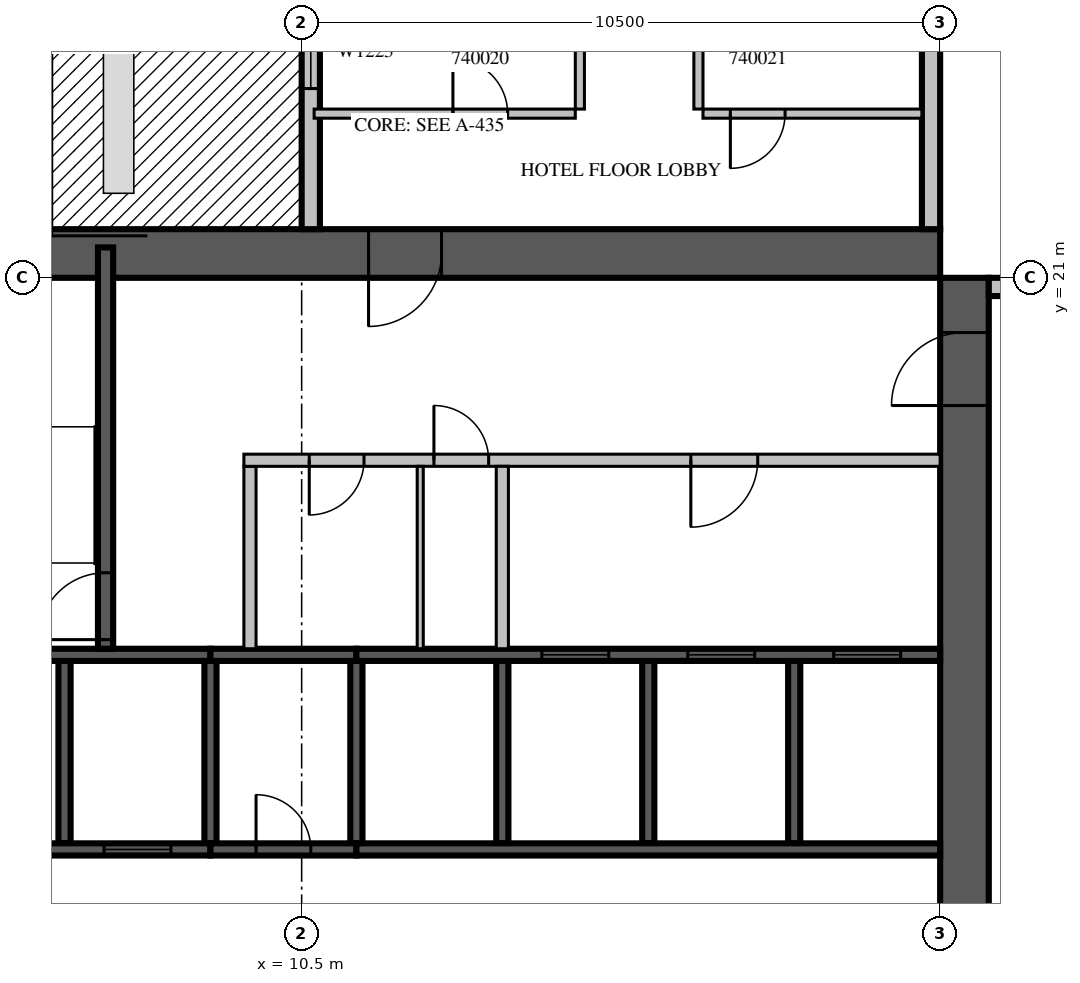
"""IFC4 building model, lengths in metres.
Left out: names, types, materials, properties, quantities, classifications, styles, units other than length and angle.
Written with IfcOpenShell. Run it as: python <this file> out.ifc"""

import sys

from ifc_helpers import new_model, si_unit, direction, frame, frame_2d, origin, place, context, subcontext, project, spatial, rectangle, extrude, source, transform, mapped, element, fill, save


model = new_model("IFC4")
c1 = context("Model", 3, precision=1e-05, world=origin(), true_north=direction((0.0, 1.0)))
c2 = subcontext(c1, "Body", "Model", "MODEL_VIEW")
j1 = project(units=[si_unit("LENGTHUNIT", "METRE"), si_unit("PLANEANGLEUNIT", "RADIAN")], contexts=[c1])
p1 = place(None, origin())
s1 = spatial("IfcSite", under=j1, at=p1, CompositionType="ELEMENT")
p2 = place(p1, origin())
s2 = spatial("IfcBuilding", under=s1, at=p2, CompositionType="ELEMENT")
p3 = place(p2, frame((0.0, 0.0, 185.4)))
s3 = spatial("IfcBuildingStorey", under=s2, at=p3, CompositionType="ELEMENT", Elevation=185.4)
m1 = source(origin(), c2, "Body", "SweptSolid", [
    extrude(rectangle(XDim=16.8, YDim=0.8, at=frame_2d((8.4, 0.0))), origin(), (0.0, 0.0, 1.0), 3.8),
])
p4 = place(p3, frame((21.4, 4.2, 0.0), z_axis=(0.0, 0.0, 1.0), x_axis=(0.0, 1.0, 0.0)))
e1 = element("IfcWall", 1, at=p4, inside=s3, PredefinedType="SHEAR", context=c2, shape_type="MappedRepresentation", body=[
    mapped(m1, transform((0.0, 0.0, 0.0), scale=1.0)),
])
m2 = source(origin(), c2, "Body", "SweptSolid", [
    extrude(rectangle(XDim=2.2, YDim=2.1, at=frame_2d((1.1, 1.05))), frame((0.0, 0.41, 0.0), z_axis=(0.0, -1.0, 0.0), x_axis=(1.0, 0.0, 0.0)), (0.0, 0.0, 1.0), 0.82),
])
p5 = place(p4, frame((4.2, 0.0, 0.0)))
e2 = element("IfcOpeningElement", 2, at=p5, cuts=e1, PredefinedType="OPENING", context=c2, shape_type="MappedRepresentation", body=[
    mapped(m2, transform((0.0, 0.0, 0.0), scale=1.0)),
])
m3 = source(origin(), c2, "Body", "SweptSolid", [
    extrude(rectangle(XDim=1.2, YDim=2.1, at=frame_2d((0.6, 1.05))), frame((0.0, 0.41, 0.0), z_axis=(0.0, -1.0, 0.0), x_axis=(1.0, 0.0, 0.0)), (0.0, 0.0, 1.0), 0.82),
])
p6 = place(p4, frame((14.7, 0.0, 0.0)))
e3 = element("IfcOpeningElement", 3, at=p6, cuts=e1, PredefinedType="OPENING", context=c2, shape_type="MappedRepresentation", body=[
    mapped(m3, transform((0.0, 0.0, 0.0), scale=1.0)),
])
p7 = place(p3, frame((4.2, 21.4, 0.0), z_axis=(0.0, 0.0, 1.0), x_axis=(1.0, 0.0, 0.0)))
e4 = element("IfcWall", 4, at=p7, inside=s3, PredefinedType="SHEAR", context=c2, shape_type="MappedRepresentation", body=[
    mapped(m1, transform((0.0, 0.0, 0.0), scale=1.0)),
])
p8 = place(p7, frame((7.4, 0.0, 0.0)))
e5 = element("IfcOpeningElement", 5, at=p8, cuts=e4, PredefinedType="OPENING", context=c2, shape_type="MappedRepresentation", body=[
    mapped(m3, transform((0.0, 0.0, 0.0), scale=1.0)),
])
m4 = source(origin(), c2, "Body", "SweptSolid", [
    extrude(rectangle(XDim=7.15, YDim=0.3, at=frame_2d((3.575, 0.0))), origin(), (0.0, 0.0, 1.0), 3.4),
])
p9 = place(p3, frame((28.95, 20.85, 0.0), z_axis=(0.0, 0.0, 1.0), x_axis=(-1.0, 0.0, 0.0)))
e6 = element("IfcWall", 6, at=p9, inside=s3, PredefinedType="STANDARD", context=c2, shape_type="MappedRepresentation", body=[
    mapped(m4, transform((0.0, 0.0, 0.0), scale=1.0)),
])
m5 = source(origin(), c2, "Body", "SweptSolid", [
    extrude(rectangle(XDim=3.0, YDim=2.3, at=frame_2d((1.5, 1.15))), frame((0.0, 0.16, 0.0), z_axis=(0.0, -1.0, 0.0), x_axis=(1.0, 0.0, 0.0)), (0.0, 0.0, 1.0), 0.32),
])
p10 = place(p9, frame((0.15, 0.0, 0.6)))
e7 = element("IfcOpeningElement", 7, at=p10, cuts=e6, PredefinedType="OPENING", context=c2, shape_type="MappedRepresentation", body=[
    mapped(m5, transform((0.0, 0.0, 0.0), scale=1.0)),
])
p11 = place(p3, frame((20.85, 21.8, 0.0), z_axis=(0.0, 0.0, 1.0), x_axis=(0.0, 1.0, 0.0)))
e8 = element("IfcWall", 8, at=p11, inside=s3, PredefinedType="STANDARD", context=c2, shape_type="MappedRepresentation", body=[
    mapped(m4, transform((0.0, 0.0, 0.0), scale=1.0)),
])
p12 = place(p11, frame((4.0, 0.0, 0.6)))
e9 = element("IfcOpeningElement", 9, at=p12, cuts=e8, PredefinedType="OPENING", context=c2, shape_type="MappedRepresentation", body=[
    mapped(m5, transform((0.0, 0.0, 0.0), scale=1.0)),
])
p13 = place(p3, frame((10.65, 28.95, 0.0), z_axis=(0.0, 0.0, 1.0), x_axis=(0.0, -1.0, 0.0)))
e10 = element("IfcWall", 10, at=p13, inside=s3, PredefinedType="STANDARD", context=c2, shape_type="MappedRepresentation", body=[
    mapped(m4, transform((0.0, 0.0, 0.0), scale=1.0)),
])
m6 = source(origin(), c2, "Body", "SweptSolid", [
    extrude(rectangle(XDim=1.8, YDim=2.4, at=frame_2d((0.9, 1.2))), frame((0.0, 0.16, 0.0), z_axis=(0.0, -1.0, 0.0), x_axis=(1.0, 0.0, 0.0)), (0.0, 0.0, 1.0), 0.32),
])
p14 = place(p13, frame((0.15, 0.0, 0.0)))
e11 = element("IfcOpeningElement", 11, at=p14, cuts=e10, PredefinedType="OPENING", context=c2, shape_type="MappedRepresentation", body=[
    mapped(m6, transform((0.0, 0.0, 0.0), scale=1.0)),
])
m7 = source(origin(), c2, "Body", "SweptSolid", [
    extrude(rectangle(XDim=1.2, YDim=2.3, at=frame_2d((0.6, 1.15))), frame((0.0, 0.16, 0.0), z_axis=(0.0, -1.0, 0.0), x_axis=(1.0, 0.0, 0.0)), (0.0, 0.0, 1.0), 0.32),
])
p15 = place(p13, frame((3.638, 0.0, 0.6)))
e12 = element("IfcOpeningElement", 12, at=p15, cuts=e10, PredefinedType="OPENING", context=c2, shape_type="MappedRepresentation", body=[
    mapped(m7, transform((0.0, 0.0, 0.0), scale=1.0)),
])
m8 = source(origin(), c2, "Body", "SweptSolid", [
    extrude(rectangle(XDim=3.0, YDim=0.2, at=frame_2d((1.5, 0.0))), origin(), (0.0, 0.0, 1.0), 3.8),
])
p16 = place(p3, frame((6.6, 11.7, 0.0), z_axis=(0.0, 0.0, 1.0), x_axis=(0.0, 1.0, 0.0)))
e13 = element("IfcWall", 13, at=p16, inside=s3, PredefinedType="SOLIDWALL", context=c2, shape_type="MappedRepresentation", body=[
    mapped(m8, transform((0.0, 0.0, 0.0), scale=1.0)),
])
m9 = source(origin(), c2, "Body", "SweptSolid", [
    extrude(rectangle(XDim=3.0, YDim=0.2, at=frame_2d((1.5, 0.0))), origin(), (0.0, 0.0, 1.0), 3.4),
])
for number, where, z_axis, x_axis in (
    (14, (9.0, 11.7, 0.0), (0.0, 0.0, 1.0), (0.0, 1.0, 0.0)),
    (15, (11.4, 11.7, 0.0), (0.0, 0.0, 1.0), (0.0, 1.0, 0.0)),
):
    element("IfcWall", number, at=place(p3, frame(where, z_axis=z_axis, x_axis=x_axis)), inside=s3, PredefinedType="SOLIDWALL", context=c2, shape_type="MappedRepresentation", body=[
        mapped(m9, transform((0.0, 0.0, 0.0), scale=1.0)),
    ])
for number, where, z_axis, x_axis in (
    (16, (13.8, 11.7, 0.0), (0.0, 0.0, 1.0), (0.0, 1.0, 0.0)),
    (17, (16.2, 11.7, 0.0), (0.0, 0.0, 1.0), (0.0, 1.0, 0.0)),
    (18, (18.6, 11.7, 0.0), (0.0, 0.0, 1.0), (0.0, 1.0, 0.0)),
):
    element("IfcWall", number, at=place(p3, frame(where, z_axis=z_axis, x_axis=x_axis)), inside=s3, PredefinedType="SOLIDWALL", context=c2, shape_type="MappedRepresentation", body=[
        mapped(m8, transform((0.0, 0.0, 0.0), scale=1.0)),
    ])
m10 = source(origin(), c2, "Body", "SweptSolid", [
    extrude(rectangle(XDim=4.8, YDim=0.2, at=frame_2d((2.4, 0.0))), origin(), (0.0, 0.0, 1.0), 3.8),
])
p17 = place(p3, frame((4.2, 11.6, 0.0), z_axis=(0.0, 0.0, 1.0), x_axis=(1.0, 0.0, 0.0)))
e19 = element("IfcWall", 19, at=p17, inside=s3, PredefinedType="SOLIDWALL", context=c2, shape_type="MappedRepresentation", body=[
    mapped(m10, transform((0.0, 0.0, 0.0), scale=1.0)),
])
m11 = source(origin(), c2, "Body", "SweptSolid", [
    extrude(rectangle(XDim=1.1, YDim=2.1, at=frame_2d((0.55, 1.05))), frame((0.0, 0.11, 0.0), z_axis=(0.0, -1.0, 0.0), x_axis=(1.0, 0.0, 0.0)), (0.0, 0.0, 1.0), 0.22),
])
p18 = place(p17, frame((0.65, 0.0, 0.0)))
e20 = element("IfcOpeningElement", 20, at=p18, cuts=e19, PredefinedType="OPENING", context=c2, shape_type="MappedRepresentation", body=[
    mapped(m11, transform((0.0, 0.0, 0.0), scale=1.0)),
])
p19 = place(p17, frame((3.05, 0.0, 0.0)))
e21 = element("IfcOpeningElement", 21, at=p19, cuts=e19, PredefinedType="OPENING", context=c2, shape_type="MappedRepresentation", body=[
    mapped(m11, transform((0.0, 0.0, 0.0), scale=1.0)),
])
m12 = source(origin(), c2, "Body", "SweptSolid", [
    extrude(rectangle(XDim=2.4, YDim=0.2, at=frame_2d((1.2, 0.0))), origin(), (0.0, 0.0, 1.0), 3.4),
])
p20 = place(p3, frame((9.0, 11.6, 0.0), z_axis=(0.0, 0.0, 1.0), x_axis=(1.0, 0.0, 0.0)))
e22 = element("IfcWall", 22, at=p20, inside=s3, PredefinedType="SOLIDWALL", context=c2, shape_type="MappedRepresentation", body=[
    mapped(m12, transform((0.0, 0.0, 0.0), scale=1.0)),
])
m13 = source(origin(), c2, "Body", "SweptSolid", [
    extrude(rectangle(XDim=0.9, YDim=2.1, at=frame_2d((0.45, 1.05))), frame((0.0, 0.11, 0.0), z_axis=(0.0, -1.0, 0.0), x_axis=(1.0, 0.0, 0.0)), (0.0, 0.0, 1.0), 0.22),
])
p21 = place(p20, frame((0.75, 0.0, 0.0)))
e23 = element("IfcOpeningElement", 23, at=p21, cuts=e22, PredefinedType="OPENING", context=c2, shape_type="MappedRepresentation", body=[
    mapped(m13, transform((0.0, 0.0, 0.0), scale=1.0)),
])
m14 = source(origin(), c2, "Body", "SweptSolid", [
    extrude(rectangle(XDim=9.6, YDim=0.2, at=frame_2d((4.8, 0.0))), origin(), (0.0, 0.0, 1.0), 3.8),
])
p22 = place(p3, frame((11.4, 11.6, 0.0), z_axis=(0.0, 0.0, 1.0), x_axis=(1.0, 0.0, 0.0)))
e24 = element("IfcWall", 24, at=p22, inside=s3, PredefinedType="SOLIDWALL", context=c2, shape_type="MappedRepresentation", body=[
    mapped(m14, transform((0.0, 0.0, 0.0), scale=1.0)),
])
p23 = place(p3, frame((4.2, 14.8, 0.0), z_axis=(0.0, 0.0, 1.0), x_axis=(1.0, 0.0, 0.0)))
e25 = element("IfcWall", 25, at=p23, inside=s3, PredefinedType="SOLIDWALL", context=c2, shape_type="MappedRepresentation", body=[
    mapped(m10, transform((0.0, 0.0, 0.0), scale=1.0)),
])
p24 = place(p3, frame((9.0, 14.8, 0.0), z_axis=(0.0, 0.0, 1.0), x_axis=(1.0, 0.0, 0.0)))
e26 = element("IfcWall", 26, at=p24, inside=s3, PredefinedType="SOLIDWALL", context=c2, shape_type="MappedRepresentation", body=[
    mapped(m12, transform((0.0, 0.0, 0.0), scale=1.0)),
])
p25 = place(p3, frame((11.4, 14.8, 0.0), z_axis=(0.0, 0.0, 1.0), x_axis=(1.0, 0.0, 0.0)))
e27 = element("IfcWall", 27, at=p25, inside=s3, PredefinedType="SOLIDWALL", context=c2, shape_type="MappedRepresentation", body=[
    mapped(m14, transform((0.0, 0.0, 0.0), scale=1.0)),
])
p26 = place(p25, frame((3.05, 0.0, 0.0)))
e28 = element("IfcOpeningElement", 28, at=p26, cuts=e27, PredefinedType="OPENING", context=c2, shape_type="MappedRepresentation", body=[
    mapped(m11, transform((0.0, 0.0, 0.0), scale=1.0)),
])
p27 = place(p25, frame((5.45, 0.0, 0.0)))
e29 = element("IfcOpeningElement", 29, at=p27, cuts=e27, PredefinedType="OPENING", context=c2, shape_type="MappedRepresentation", body=[
    mapped(m11, transform((0.0, 0.0, 0.0), scale=1.0)),
])
p28 = place(p25, frame((7.85, 0.0, 0.0)))
e30 = element("IfcOpeningElement", 30, at=p28, cuts=e27, PredefinedType="OPENING", context=c2, shape_type="MappedRepresentation", body=[
    mapped(m11, transform((0.0, 0.0, 0.0), scale=1.0)),
])
m15 = source(origin(), c2, "Body", "SweptSolid", [
    extrude(rectangle(XDim=6.6, YDim=0.25, at=frame_2d((3.3, 0.0))), origin(), (0.0, 0.0, 1.0), 3.4),
])
p29 = place(p3, frame((7.275, 14.9, 0.0), z_axis=(0.0, 0.0, 1.0), x_axis=(0.0, 1.0, 0.0)))
e31 = element("IfcWall", 31, at=p29, inside=s3, PredefinedType="SOLIDWALL", context=c2, shape_type="MappedRepresentation", body=[
    mapped(m15, transform((0.0, 0.0, 0.0), scale=1.0)),
])
m16 = source(origin(), c2, "Body", "SweptSolid", [
    extrude(rectangle(XDim=1.1, YDim=2.1, at=frame_2d((0.55, 1.05))), frame((0.0, 0.135, 0.0), z_axis=(0.0, -1.0, 0.0), x_axis=(1.0, 0.0, 0.0)), (0.0, 0.0, 1.0), 0.27),
])
p30 = place(p29, frame((0.15, 0.0, 0.0)))
e32 = element("IfcOpeningElement", 32, at=p30, cuts=e31, PredefinedType="OPENING", context=c2, shape_type="MappedRepresentation", body=[
    mapped(m16, transform((0.0, 0.0, 0.0), scale=1.0)),
])
m17 = source(origin(), c2, "Body", "SweptSolid", [
    extrude(rectangle(XDim=3.0, YDim=0.2, at=frame_2d((1.5, 0.0))), origin(), (0.0, 0.0, 1.0), 3.4),
])
p31 = place(p3, frame((9.65, 14.9, 0.0), z_axis=(0.0, 0.0, 1.0), x_axis=(0.0, 1.0, 0.0)))
e33 = element("IfcWall", 33, at=p31, inside=s3, PredefinedType="PARTITIONING", context=c2, shape_type="MappedRepresentation", body=[
    mapped(m17, transform((0.0, 0.0, 0.0), scale=1.0)),
])
m18 = source(origin(), c2, "Body", "SweptSolid", [
    extrude(rectangle(XDim=11.45, YDim=0.2, at=frame_2d((5.725, 0.0))), origin(), (0.0, 0.0, 1.0), 3.4),
])
p32 = place(p3, frame((9.55, 18.0, 0.0), z_axis=(0.0, 0.0, 1.0), x_axis=(1.0, 0.0, 0.0)))
e34 = element("IfcWall", 34, at=p32, inside=s3, PredefinedType="PARTITIONING", context=c2, shape_type="MappedRepresentation", body=[
    mapped(m18, transform((0.0, 0.0, 0.0), scale=1.0)),
])
p33 = place(p32, frame((1.075, 0.0, 0.0)))
e35 = element("IfcOpeningElement", 35, at=p33, cuts=e34, PredefinedType="OPENING", context=c2, shape_type="MappedRepresentation", body=[
    mapped(m13, transform((0.0, 0.0, 0.0), scale=1.0)),
])
p34 = place(p32, frame((3.125, 0.0, 0.0)))
e36 = element("IfcOpeningElement", 36, at=p34, cuts=e34, PredefinedType="OPENING", context=c2, shape_type="MappedRepresentation", body=[
    mapped(m13, transform((0.0, 0.0, 0.0), scale=1.0)),
])
p35 = place(p32, frame((7.35, 0.0, 0.0)))
e37 = element("IfcOpeningElement", 37, at=p35, cuts=e34, PredefinedType="OPENING", context=c2, shape_type="MappedRepresentation", body=[
    mapped(m11, transform((0.0, 0.0, 0.0), scale=1.0)),
])
p36 = place(p3, frame((13.8, 14.9, 0.0), z_axis=(0.0, 0.0, 1.0), x_axis=(0.0, 1.0, 0.0)))
e38 = element("IfcWall", 38, at=p36, inside=s3, PredefinedType="PARTITIONING", context=c2, shape_type="MappedRepresentation", body=[
    mapped(m17, transform((0.0, 0.0, 0.0), scale=1.0)),
])
m19 = source(origin(), c2, "Body", "SweptSolid", [
    extrude(rectangle(XDim=3.0, YDim=0.1, at=frame_2d((1.5, 0.0))), origin(), (0.0, 0.0, 1.0), 3.4),
])
p37 = place(p3, frame((12.45, 14.9, 0.0), z_axis=(0.0, 0.0, 1.0), x_axis=(0.0, 1.0, 0.0)))
e39 = element("IfcWall", 39, at=p37, inside=s3, PredefinedType="PARTITIONING", context=c2, shape_type="MappedRepresentation", body=[
    mapped(m19, transform((0.0, 0.0, 0.0), scale=1.0)),
])
p38 = place(p3, frame((10.705, 23.7, 0.0), z_axis=(0.0, 0.0, 1.0), x_axis=(1.0, 0.0, 0.0)))
e40 = element("IfcWall", 40, at=p38, inside=s3, PredefinedType="PARTITIONING", context=c2, shape_type="SweptSolid", body=[
    extrude(rectangle(XDim=4.295, YDim=0.15, at=frame_2d((2.147, 0.0))), origin(), (0.0, 0.0, 1.0), 3.4),
])
m20 = source(origin(), c2, "Body", "SweptSolid", [
    extrude(rectangle(XDim=0.9, YDim=2.1, at=frame_2d((0.45, 1.05))), frame((0.0, 0.085, 0.0), z_axis=(0.0, -1.0, 0.0), x_axis=(1.0, 0.0, 0.0)), (0.0, 0.0, 1.0), 0.17),
])
p39 = place(p38, frame((2.283, 0.0, 0.0)))
e41 = element("IfcOpeningElement", 41, at=p39, cuts=e40, PredefinedType="OPENING", context=c2, shape_type="MappedRepresentation", body=[
    mapped(m20, transform((0.0, 0.0, 0.0), scale=1.0)),
])
m21 = source(origin(), c2, "Body", "SweptSolid", [
    extrude(rectangle(XDim=3.6, YDim=0.15, at=frame_2d((1.8, 0.0))), origin(), (0.0, 0.0, 1.0), 3.4),
])
p40 = place(p3, frame((17.1, 23.7, 0.0), z_axis=(0.0, 0.0, 1.0), x_axis=(1.0, 0.0, 0.0)))
e42 = element("IfcWall", 42, at=p40, inside=s3, PredefinedType="PARTITIONING", context=c2, shape_type="MappedRepresentation", body=[
    mapped(m21, transform((0.0, 0.0, 0.0), scale=1.0)),
])
p41 = place(p40, frame((0.45, 0.0, 0.0)))
e43 = element("IfcOpeningElement", 43, at=p41, cuts=e42, PredefinedType="OPENING", context=c2, shape_type="MappedRepresentation", body=[
    mapped(m20, transform((0.0, 0.0, 0.0), scale=1.0)),
])
m22 = source(origin(), c2, "Body", "SweptSolid", [
    extrude(rectangle(XDim=5.55, YDim=0.15, at=frame_2d((2.775, 0.0))), origin(), (0.0, 0.0, 1.0), 3.4),
])
for number, where, z_axis, x_axis in (
    (44, (15.075, 23.775, 0.0), (0.0, 0.0, 1.0), (0.0, 1.0, 0.0)),
    (45, (17.025, 29.325, 0.0), (0.0, 0.0, 1.0), (0.0, -1.0, 0.0)),
):
    element("IfcWall", number, at=place(p3, frame(where, z_axis=z_axis, x_axis=x_axis)), inside=s3, PredefinedType="PARTITIONING", context=c2, shape_type="MappedRepresentation", body=[
        mapped(m22, transform((0.0, 0.0, 0.0), scale=1.0)),
    ])
m23 = source(origin(), c2, "Body", "SweptSolid", [
    extrude(rectangle(XDim=1.2, YDim=2.3, at=frame_2d((0.6, 1.15))), frame((0.0, 0.03, 0.0), z_axis=(0.0, -1.0, 0.0), x_axis=(1.0, 0.0, 0.0)), (0.0, 0.0, 1.0), 0.06),
])
p42 = place(p15, origin())
e46 = element("IfcWindow", 46, at=p42, inside=s3, PartitioningType="SINGLE_PANEL", PredefinedType="WINDOW", context=c2, shape_type="MappedRepresentation", body=[
    mapped(m23, transform((0.0, 0.0, 0.0), scale=1.0)),
])
fill(e12, e46)
m24 = source(origin(), c2, "Body", "SweptSolid", [
    extrude(rectangle(XDim=1.1, YDim=2.1, at=frame_2d((0.55, 1.05))), frame((0.0, 0.025, 0.0), z_axis=(0.0, -1.0, 0.0), x_axis=(1.0, 0.0, 0.0)), (0.0, 0.0, 1.0), 0.05),
])
p43 = place(p19, origin())
e47 = element("IfcDoor", 47, at=p43, inside=s3, OperationType="SLIDING_TO_LEFT", PredefinedType="DOOR", context=c2, shape_type="MappedRepresentation", body=[
    mapped(m24, transform((0.0, 0.0, 0.0), scale=1.0)),
])
fill(e21, e47)
m25 = source(origin(), c2, "Body", "SweptSolid", [
    extrude(rectangle(XDim=0.9, YDim=2.1, at=frame_2d((0.45, 1.05))), frame((0.0, 0.025, 0.0), z_axis=(0.0, -1.0, 0.0), x_axis=(1.0, 0.0, 0.0)), (0.0, 0.0, 1.0), 0.05),
])
p44 = place(p21, origin())
e48 = element("IfcDoor", 48, at=p44, inside=s3, OperationType="SINGLE_SWING_LEFT", PredefinedType="DOOR", context=c2, shape_type="MappedRepresentation", body=[
    mapped(m25, transform((0.0, 0.0, 0.0), scale=1.0)),
])
fill(e23, e48)
p45 = place(p26, origin())
e49 = element("IfcDoor", 49, at=p45, inside=s3, OperationType="SLIDING_TO_LEFT", PredefinedType="DOOR", context=c2, shape_type="MappedRepresentation", body=[
    mapped(m24, transform((0.0, 0.0, 0.0), scale=1.0)),
])
fill(e28, e49)
p46 = place(p27, origin())
e50 = element("IfcDoor", 50, at=p46, inside=s3, OperationType="SLIDING_TO_LEFT", PredefinedType="DOOR", context=c2, shape_type="MappedRepresentation", body=[
    mapped(m24, transform((0.0, 0.0, 0.0), scale=1.0)),
])
fill(e29, e50)
p47 = place(p28, origin())
e51 = element("IfcDoor", 51, at=p47, inside=s3, OperationType="SLIDING_TO_LEFT", PredefinedType="DOOR", context=c2, shape_type="MappedRepresentation", body=[
    mapped(m24, transform((0.0, 0.0, 0.0), scale=1.0)),
])
fill(e30, e51)
p48 = place(p30, origin())
e52 = element("IfcDoor", 52, at=p48, inside=s3, OperationType="SINGLE_SWING_LEFT", PredefinedType="DOOR", context=c2, shape_type="MappedRepresentation", body=[
    mapped(m24, transform((0.0, 0.0, 0.0), scale=1.0)),
])
fill(e32, e52)
p49 = place(p33, origin())
e53 = element("IfcDoor", 53, at=p49, inside=s3, OperationType="SINGLE_SWING_RIGHT", PredefinedType="DOOR", context=c2, shape_type="MappedRepresentation", body=[
    mapped(m25, transform((0.0, 0.0, 0.0), scale=1.0)),
])
fill(e35, e53)
p50 = place(p34, origin())
e54 = element("IfcDoor", 54, at=p50, inside=s3, OperationType="SINGLE_SWING_LEFT", PredefinedType="DOOR", context=c2, shape_type="MappedRepresentation", body=[
    mapped(m25, transform((0.0, 0.0, 0.0), scale=1.0)),
])
fill(e36, e54)
p51 = place(p35, origin())
e55 = element("IfcDoor", 55, at=p51, inside=s3, OperationType="SINGLE_SWING_RIGHT", PredefinedType="DOOR", context=c2, shape_type="MappedRepresentation", body=[
    mapped(m24, transform((0.0, 0.0, 0.0), scale=1.0)),
])
fill(e37, e55)
m26 = source(origin(), c2, "Body", "SweptSolid", [
    extrude(rectangle(XDim=1.2, YDim=2.1, at=frame_2d((0.6, 1.05))), frame((0.0, 0.025, 0.0), z_axis=(0.0, -1.0, 0.0), x_axis=(1.0, 0.0, 0.0)), (0.0, 0.0, 1.0), 0.05),
])
p52 = place(p8, origin())
e56 = element("IfcDoor", 56, at=p52, inside=s3, OperationType="SINGLE_SWING_RIGHT", PredefinedType="DOOR", context=c2, shape_type="MappedRepresentation", body=[
    mapped(m26, transform((0.0, 0.0, 0.0), scale=1.0)),
])
fill(e5, e56)
p53 = place(p6, origin())
e57 = element("IfcDoor", 57, at=p53, inside=s3, OperationType="SINGLE_SWING_LEFT", PredefinedType="DOOR", context=c2, shape_type="MappedRepresentation", body=[
    mapped(m26, transform((0.0, 0.0, 0.0), scale=1.0)),
])
fill(e3, e57)
p54 = place(p39, origin())
e58 = element("IfcDoor", 58, at=p54, inside=s3, OperationType="SINGLE_SWING_LEFT", PredefinedType="DOOR", context=c2, shape_type="MappedRepresentation", body=[
    mapped(m25, transform((0.0, 0.0, 0.0), scale=1.0)),
])
fill(e41, e58)
p55 = place(p41, origin())
e59 = element("IfcDoor", 59, at=p55, inside=s3, OperationType="SINGLE_SWING_RIGHT", PredefinedType="DOOR", context=c2, shape_type="MappedRepresentation", body=[
    mapped(m25, transform((0.0, 0.0, 0.0), scale=1.0)),
])
fill(e43, e59)
save(model, sys.argv[1])
